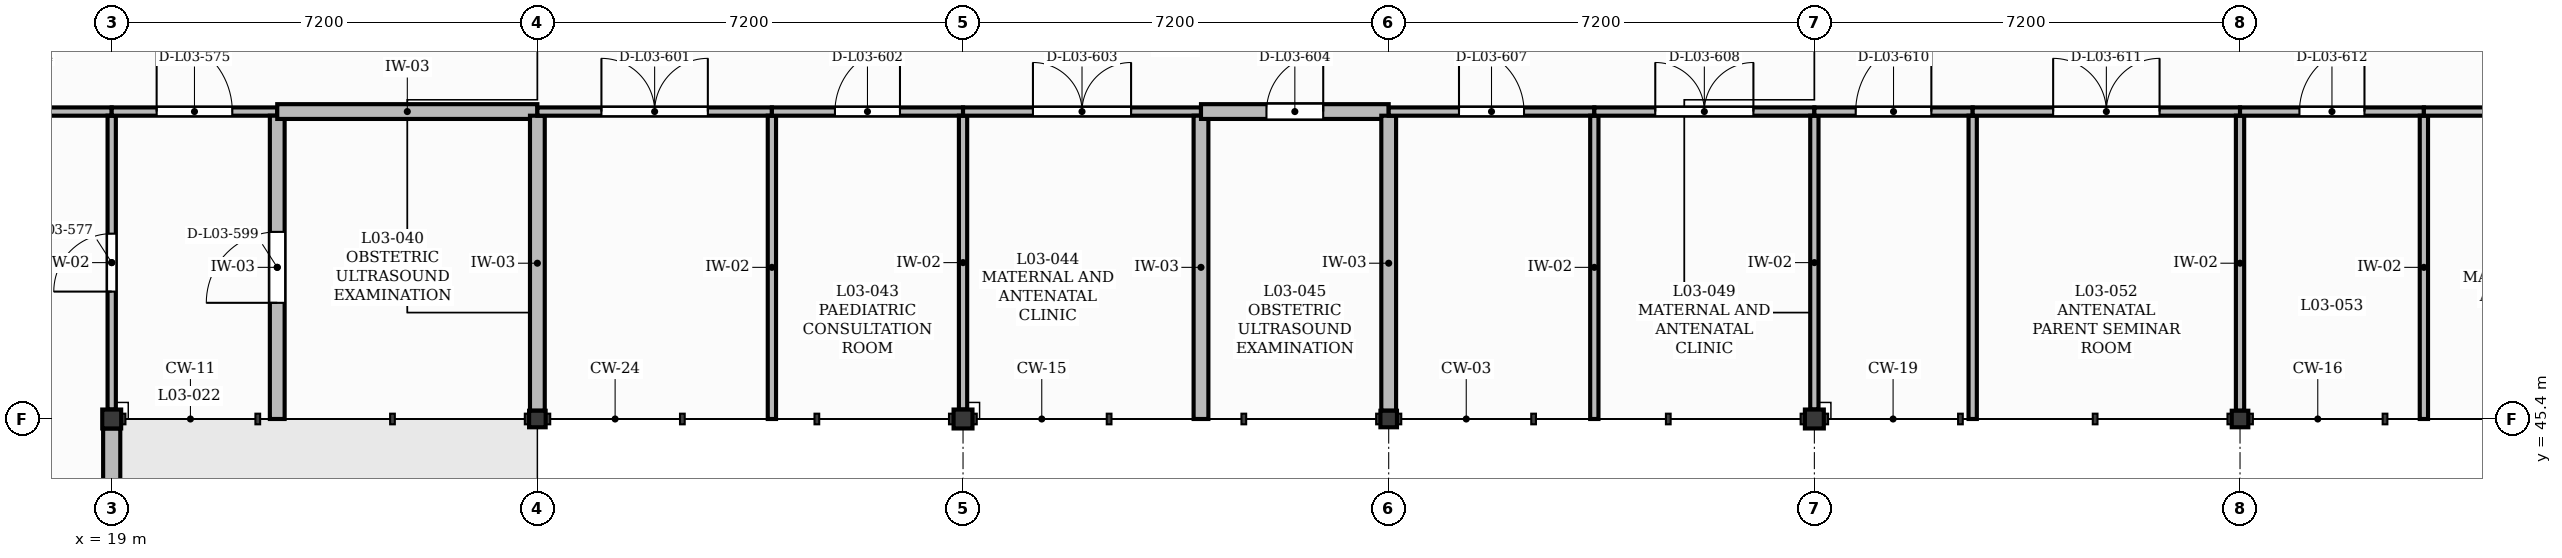
"""IFC4 building model, lengths in metres.
Left out: names, types, materials, properties, quantities, classifications, styles, units other than length and angle.
Written with IfcOpenShell. Run it as: python <this file> out.ifc"""

import sys

from ifc_helpers import new_model, si_unit, direction, frame, frame_2d, origin, origin_2d, place, context, subcontext, project, spatial, rectangle, extrude, element, fill, save


model = new_model("IFC4")
c1 = context("Model", 3, precision=1e-05, world=origin(), true_north=direction((0.0, 1.0)))
c2 = subcontext(c1, "Body", "Model", "MODEL_VIEW")
j1 = project(units=[si_unit("LENGTHUNIT", "METRE"), si_unit("PLANEANGLEUNIT", "RADIAN")], contexts=[c1])
p1 = place(None, origin())
s1 = spatial("IfcSite", under=j1, at=p1, CompositionType="ELEMENT")
p2 = place(p1, origin())
s2 = spatial("IfcBuilding", under=s1, at=p2, CompositionType="ELEMENT")
p3 = place(p2, frame((0.0, 0.0, 13.2)))
s3 = spatial("IfcBuildingStorey", under=s2, at=p3, CompositionType="ELEMENT", Elevation=13.2)
p4 = place(p3, frame((19.0, 45.4, 0.0), z_axis=(0.0, 0.0, 1.0), x_axis=(1.0, 0.0, 0.0)))
e1 = element("IfcColumn", 1, at=p4, inside=s3, PredefinedType="COLUMN", context=c2, shape_type="SweptSolid", body=[
    extrude(rectangle(XDim=0.32, YDim=0.32, at=origin_2d()), origin(), (0.0, 0.0, 1.0), 3.98),
])
p5 = place(p3, frame((26.2, 45.4, 0.0), z_axis=(0.0, 0.0, 1.0), x_axis=(1.0, 0.0, 0.0)))
e2 = element("IfcColumn", 2, at=p5, inside=s3, PredefinedType="COLUMN", context=c2, shape_type="SweptSolid", body=[
    extrude(rectangle(XDim=0.28, YDim=0.28, at=origin_2d()), origin(), (0.0, 0.0, 1.0), 4.01),
])
p6 = place(p3, frame((33.4, 45.4, 0.0), z_axis=(0.0, 0.0, 1.0), x_axis=(1.0, 0.0, 0.0)))
e3 = element("IfcColumn", 3, at=p6, inside=s3, PredefinedType="COLUMN", context=c2, shape_type="SweptSolid", body=[
    extrude(rectangle(XDim=0.32, YDim=0.32, at=origin_2d()), origin(), (0.0, 0.0, 1.0), 4.01),
])
p7 = place(p3, frame((40.6, 45.4, 0.0), z_axis=(0.0, 0.0, 1.0), x_axis=(1.0, 0.0, 0.0)))
e4 = element("IfcColumn", 4, at=p7, inside=s3, PredefinedType="COLUMN", context=c2, shape_type="SweptSolid", body=[
    extrude(rectangle(XDim=0.28, YDim=0.28, at=origin_2d()), origin(), (0.0, 0.0, 1.0), 4.01),
])
p8 = place(p3, frame((47.8, 45.4, 0.0), z_axis=(0.0, 0.0, 1.0), x_axis=(1.0, 0.0, 0.0)))
e5 = element("IfcColumn", 5, at=p8, inside=s3, PredefinedType="COLUMN", context=c2, shape_type="SweptSolid", body=[
    extrude(rectangle(XDim=0.32, YDim=0.32, at=origin_2d()), origin(), (0.0, 0.0, 1.0), 4.01),
])
p9 = place(p3, frame((55.0, 45.4, 0.0), z_axis=(0.0, 0.0, 1.0), x_axis=(1.0, 0.0, 0.0)))
e6 = element("IfcColumn", 6, at=p9, inside=s3, PredefinedType="COLUMN", context=c2, shape_type="SweptSolid", body=[
    extrude(rectangle(XDim=0.28, YDim=0.28, at=origin_2d()), origin(), (0.0, 0.0, 1.0), 3.98),
])
p10 = place(p3, frame((19.0, 36.94, 0.0), z_axis=(0.0, 0.0, 1.0), x_axis=(0.0, 1.0, 0.0)))
e7 = element("IfcWall", 7, at=p10, inside=s3, PredefinedType="SOLIDWALL", context=c2, shape_type="SweptSolid", body=[
    extrude(rectangle(XDim=8.3, YDim=0.29, at=frame_2d((4.15, 0.0))), origin(), (0.0, 0.0, 1.0), 3.49),
])
p11 = place(p10, frame((1.99, 0.0, 1.05)))
e8 = element("IfcOpeningElement", 8, at=p11, cuts=e7, PredefinedType="OPENING", context=c2, shape_type="SweptSolid", body=[
    extrude(rectangle(XDim=1.82, YDim=1.65, at=frame_2d((0.91, 0.825))), frame((0.0, 0.155, 0.0), z_axis=(0.0, -1.0, 0.0), x_axis=(1.0, 0.0, 0.0)), (0.0, 0.0, 1.0), 0.31),
])
p12 = place(p10, frame((4.49, 0.0, 1.05)))
e9 = element("IfcOpeningElement", 9, at=p12, cuts=e7, PredefinedType="OPENING", context=c2, shape_type="SweptSolid", body=[
    extrude(rectangle(XDim=1.82, YDim=1.65, at=frame_2d((0.91, 0.825))), frame((0.0, 0.155, 0.0), z_axis=(0.0, -1.0, 0.0), x_axis=(1.0, 0.0, 0.0)), (0.0, 0.0, 1.0), 0.31),
])
p13 = place(p3, frame((15.8, 50.6, 0.0), z_axis=(0.0, 0.0, 1.0), x_axis=(1.0, 0.0, 0.0)))
e10 = element("IfcWall", 10, at=p13, inside=s3, PredefinedType="PARTITIONING", context=c2, shape_type="SweptSolid", body=[
    extrude(rectangle(XDim=3.2, YDim=0.14, at=frame_2d((1.6, 0.0))), origin(), (0.0, 0.0, 1.0), 3.93),
])
p14 = place(p13, frame((1.08, 0.0, 0.0)))
e11 = element("IfcOpeningElement", 11, at=p14, cuts=e10, PredefinedType="OPENING", context=c2, shape_type="SweptSolid", body=[
    extrude(rectangle(XDim=1.04, YDim=2.1, at=frame_2d((0.52, 1.05))), frame((0.0, 0.08, 0.0), z_axis=(0.0, -1.0, 0.0), x_axis=(1.0, 0.0, 0.0)), (0.0, 0.0, 1.0), 0.16),
])
p15 = place(p3, frame((19.0, 45.56, 0.0), z_axis=(0.0, 0.0, 1.0), x_axis=(0.0, 1.0, 0.0)))
e12 = element("IfcWall", 12, at=p15, inside=s3, PredefinedType="PARTITIONING", context=c2, shape_type="SweptSolid", body=[
    extrude(rectangle(XDim=4.97, YDim=0.14, at=frame_2d((2.485, 0.0))), origin(), (0.0, 0.0, 1.0), 3.46),
])
p16 = place(p15, frame((1.995, 0.0, 0.0)))
e13 = element("IfcOpeningElement", 13, at=p16, cuts=e12, PredefinedType="OPENING", context=c2, shape_type="SweptSolid", body=[
    extrude(rectangle(XDim=0.98, YDim=2.15, at=frame_2d((0.49, 1.075))), frame((0.0, 0.08, 0.0), z_axis=(0.0, -1.0, 0.0), x_axis=(1.0, 0.0, 0.0)), (0.0, 0.0, 1.0), 0.16),
])
p17 = place(p3, frame((19.0, 50.6, 0.0), z_axis=(0.0, 0.0, 1.0), x_axis=(1.0, 0.0, 0.0)))
e14 = element("IfcWall", 14, at=p17, inside=s3, PredefinedType="PARTITIONING", context=c2, shape_type="SweptSolid", body=[
    extrude(rectangle(XDim=2.8, YDim=0.14, at=frame_2d((1.4, 0.0))), origin(), (0.0, 0.0, 1.0), 3.93),
])
p18 = place(p17, frame((0.76, 0.0, 0.0)))
e15 = element("IfcOpeningElement", 15, at=p18, cuts=e14, PredefinedType="OPENING", context=c2, shape_type="SweptSolid", body=[
    extrude(rectangle(XDim=1.28, YDim=2.2, at=frame_2d((0.64, 1.1))), frame((0.0, 0.08, 0.0), z_axis=(0.0, -1.0, 0.0), x_axis=(1.0, 0.0, 0.0)), (0.0, 0.0, 1.0), 0.16),
])
p19 = place(p3, frame((21.8, 45.4, 0.0), z_axis=(0.0, 0.0, 1.0), x_axis=(0.0, 1.0, 0.0)))
e16 = element("IfcWall", 16, at=p19, inside=s3, PredefinedType="SOLIDWALL", context=c2, shape_type="SweptSolid", body=[
    extrude(rectangle(XDim=5.13, YDim=0.25, at=frame_2d((2.565, 0.0))), origin(), (0.0, 0.0, 1.0), 3.93),
])
p20 = place(p19, frame((1.965, 0.0, 0.0)))
e17 = element("IfcOpeningElement", 17, at=p20, cuts=e16, PredefinedType="OPENING", context=c2, shape_type="SweptSolid", body=[
    extrude(rectangle(XDim=1.2, YDim=2.15, at=frame_2d((0.6, 1.075))), frame((0.0, 0.135, 0.0), z_axis=(0.0, -1.0, 0.0), x_axis=(1.0, 0.0, 0.0)), (0.0, 0.0, 1.0), 0.27),
])
p21 = place(p3, frame((21.8, 50.6, 0.0), z_axis=(0.0, 0.0, 1.0), x_axis=(1.0, 0.0, 0.0)))
e18 = element("IfcWall", 18, at=p21, inside=s3, PredefinedType="SOLIDWALL", context=c2, shape_type="SweptSolid", body=[
    extrude(rectangle(XDim=4.4, YDim=0.25, at=frame_2d((2.2, 0.0))), origin(), (0.0, 0.0, 1.0), 3.96),
])
p22 = place(p3, frame((26.2, 45.54, 0.0), z_axis=(0.0, 0.0, 1.0), x_axis=(0.0, 1.0, 0.0)))
e19 = element("IfcWall", 19, at=p22, inside=s3, PredefinedType="SOLIDWALL", context=c2, shape_type="SweptSolid", body=[
    extrude(rectangle(XDim=4.99, YDim=0.25, at=frame_2d((2.495, 0.0))), origin(), (0.0, 0.0, 1.0), 3.49),
])
p23 = place(p3, frame((26.2, 50.6, 0.0), z_axis=(0.0, 0.0, 1.0), x_axis=(1.0, 0.0, 0.0)))
e20 = element("IfcWall", 20, at=p23, inside=s3, PredefinedType="PARTITIONING", context=c2, shape_type="SweptSolid", body=[
    extrude(rectangle(XDim=3.967, YDim=0.14, at=frame_2d((1.983, 0.0))), origin(), (0.0, 0.0, 1.0), 3.96),
])
p24 = place(p23, frame((1.083, 0.0, 0.0)))
e21 = element("IfcOpeningElement", 21, at=p24, cuts=e20, PredefinedType="OPENING", context=c2, shape_type="SweptSolid", body=[
    extrude(rectangle(XDim=1.8, YDim=2.3, at=frame_2d((0.9, 1.15))), frame((0.0, 0.08, 0.0), z_axis=(0.0, -1.0, 0.0), x_axis=(1.0, 0.0, 0.0)), (0.0, 0.0, 1.0), 0.16),
])
p25 = place(p3, frame((30.167, 45.4, 0.0), z_axis=(0.0, 0.0, 1.0), x_axis=(0.0, 1.0, 0.0)))
e22 = element("IfcWall", 22, at=p25, inside=s3, PredefinedType="PARTITIONING", context=c2, shape_type="SweptSolid", body=[
    extrude(rectangle(XDim=5.13, YDim=0.14, at=frame_2d((2.565, 0.0))), origin(), (0.0, 0.0, 1.0), 3.96),
])
p26 = place(p3, frame((30.167, 50.6, 0.0), z_axis=(0.0, 0.0, 1.0), x_axis=(1.0, 0.0, 0.0)))
e23 = element("IfcWall", 23, at=p26, inside=s3, PredefinedType="PARTITIONING", context=c2, shape_type="SweptSolid", body=[
    extrude(rectangle(XDim=3.233, YDim=0.14, at=frame_2d((1.616, 0.0))), origin(), (0.0, 0.0, 1.0), 3.96),
])
p27 = place(p26, frame((1.066, 0.0, 0.0)))
e24 = element("IfcOpeningElement", 24, at=p27, cuts=e23, PredefinedType="OPENING", context=c2, shape_type="SweptSolid", body=[
    extrude(rectangle(XDim=1.1, YDim=2.1, at=frame_2d((0.55, 1.05))), frame((0.0, 0.08, 0.0), z_axis=(0.0, -1.0, 0.0), x_axis=(1.0, 0.0, 0.0)), (0.0, 0.0, 1.0), 0.16),
])
p28 = place(p3, frame((33.4, 45.56, 0.0), z_axis=(0.0, 0.0, 1.0), x_axis=(0.0, 1.0, 0.0)))
e25 = element("IfcWall", 25, at=p28, inside=s3, PredefinedType="PARTITIONING", context=c2, shape_type="SweptSolid", body=[
    extrude(rectangle(XDim=4.97, YDim=0.14, at=frame_2d((2.485, 0.0))), origin(), (0.0, 0.0, 1.0), 3.49),
])
p29 = place(p3, frame((33.4, 50.6, 0.0), z_axis=(0.0, 0.0, 1.0), x_axis=(1.0, 0.0, 0.0)))
e26 = element("IfcWall", 26, at=p29, inside=s3, PredefinedType="PARTITIONING", context=c2, shape_type="SweptSolid", body=[
    extrude(rectangle(XDim=4.025, YDim=0.14, at=frame_2d((2.013, 0.0))), origin(), (0.0, 0.0, 1.0), 3.96),
])
p30 = place(p29, frame((1.183, 0.0, 0.0)))
e27 = element("IfcOpeningElement", 27, at=p30, cuts=e26, PredefinedType="OPENING", context=c2, shape_type="SweptSolid", body=[
    extrude(rectangle(XDim=1.66, YDim=2.3, at=frame_2d((0.83, 1.15))), frame((0.0, 0.08, 0.0), z_axis=(0.0, -1.0, 0.0), x_axis=(1.0, 0.0, 0.0)), (0.0, 0.0, 1.0), 0.16),
])
p31 = place(p3, frame((37.425, 45.4, 0.0), z_axis=(0.0, 0.0, 1.0), x_axis=(0.0, 1.0, 0.0)))
e28 = element("IfcWall", 28, at=p31, inside=s3, PredefinedType="SOLIDWALL", context=c2, shape_type="SweptSolid", body=[
    extrude(rectangle(XDim=5.13, YDim=0.25, at=frame_2d((2.565, 0.0))), origin(), (0.0, 0.0, 1.0), 3.96),
])
p32 = place(p3, frame((37.425, 50.6, 0.0), z_axis=(0.0, 0.0, 1.0), x_axis=(1.0, 0.0, 0.0)))
e29 = element("IfcWall", 29, at=p32, inside=s3, PredefinedType="SOLIDWALL", context=c2, shape_type="SweptSolid", body=[
    extrude(rectangle(XDim=3.175, YDim=0.25, at=frame_2d((1.587, 0.0))), origin(), (0.0, 0.0, 1.0), 3.96),
])
p33 = place(p32, frame((1.107, 0.0, 0.0)))
e30 = element("IfcOpeningElement", 30, at=p33, cuts=e29, PredefinedType="OPENING", context=c2, shape_type="SweptSolid", body=[
    extrude(rectangle(XDim=0.96, YDim=2.1, at=frame_2d((0.48, 1.05))), frame((0.0, 0.135, 0.0), z_axis=(0.0, -1.0, 0.0), x_axis=(1.0, 0.0, 0.0)), (0.0, 0.0, 1.0), 0.27),
])
p34 = place(p3, frame((40.6, 45.54, 0.0), z_axis=(0.0, 0.0, 1.0), x_axis=(0.0, 1.0, 0.0)))
e31 = element("IfcWall", 31, at=p34, inside=s3, PredefinedType="SOLIDWALL", context=c2, shape_type="SweptSolid", body=[
    extrude(rectangle(XDim=4.99, YDim=0.25, at=frame_2d((2.495, 0.0))), origin(), (0.0, 0.0, 1.0), 3.49),
])
p35 = place(p3, frame((40.6, 50.6, 0.0), z_axis=(0.0, 0.0, 1.0), x_axis=(1.0, 0.0, 0.0)))
e32 = element("IfcWall", 32, at=p35, inside=s3, PredefinedType="PARTITIONING", context=c2, shape_type="SweptSolid", body=[
    extrude(rectangle(XDim=3.478, YDim=0.14, at=frame_2d((1.739, 0.0))), origin(), (0.0, 0.0, 1.0), 3.96),
])
p36 = place(p35, frame((1.189, 0.0, 0.0)))
e33 = element("IfcOpeningElement", 33, at=p36, cuts=e32, PredefinedType="OPENING", context=c2, shape_type="SweptSolid", body=[
    extrude(rectangle(XDim=1.1, YDim=2.1, at=frame_2d((0.55, 1.05))), frame((0.0, 0.08, 0.0), z_axis=(0.0, -1.0, 0.0), x_axis=(1.0, 0.0, 0.0)), (0.0, 0.0, 1.0), 0.16),
])
p37 = place(p3, frame((44.078, 45.4, 0.0), z_axis=(0.0, 0.0, 1.0), x_axis=(0.0, 1.0, 0.0)))
e34 = element("IfcWall", 34, at=p37, inside=s3, PredefinedType="PARTITIONING", context=c2, shape_type="SweptSolid", body=[
    extrude(rectangle(XDim=5.13, YDim=0.14, at=frame_2d((2.565, 0.0))), origin(), (0.0, 0.0, 1.0), 3.96),
])
p38 = place(p3, frame((44.078, 50.6, 0.0), z_axis=(0.0, 0.0, 1.0), x_axis=(1.0, 0.0, 0.0)))
e35 = element("IfcWall", 35, at=p38, inside=s3, PredefinedType="PARTITIONING", context=c2, shape_type="SweptSolid", body=[
    extrude(rectangle(XDim=3.722, YDim=0.14, at=frame_2d((1.861, 0.0))), origin(), (0.0, 0.0, 1.0), 3.96),
])
p39 = place(p38, frame((1.031, 0.0, 0.0)))
e36 = element("IfcOpeningElement", 36, at=p39, cuts=e35, PredefinedType="OPENING", context=c2, shape_type="SweptSolid", body=[
    extrude(rectangle(XDim=1.66, YDim=2.3, at=frame_2d((0.83, 1.15))), frame((0.0, 0.08, 0.0), z_axis=(0.0, -1.0, 0.0), x_axis=(1.0, 0.0, 0.0)), (0.0, 0.0, 1.0), 0.16),
])
p40 = place(p3, frame((47.8, 45.56, 0.0), z_axis=(0.0, 0.0, 1.0), x_axis=(0.0, 1.0, 0.0)))
e37 = element("IfcWall", 37, at=p40, inside=s3, PredefinedType="PARTITIONING", context=c2, shape_type="SweptSolid", body=[
    extrude(rectangle(XDim=4.97, YDim=0.14, at=frame_2d((2.485, 0.0))), origin(), (0.0, 0.0, 1.0), 3.49),
])
p41 = place(p3, frame((47.8, 50.6, 0.0), z_axis=(0.0, 0.0, 1.0), x_axis=(1.0, 0.0, 0.0)))
e38 = element("IfcWall", 38, at=p41, inside=s3, PredefinedType="PARTITIONING", context=c2, shape_type="SweptSolid", body=[
    extrude(rectangle(XDim=2.678, YDim=0.14, at=frame_2d((1.339, 0.0))), origin(), (0.0, 0.0, 1.0), 3.96),
])
p42 = place(p41, frame((0.699, 0.0, 0.0)))
e39 = element("IfcOpeningElement", 39, at=p42, cuts=e38, PredefinedType="OPENING", context=c2, shape_type="SweptSolid", body=[
    extrude(rectangle(XDim=1.28, YDim=2.2, at=frame_2d((0.64, 1.1))), frame((0.0, 0.08, 0.0), z_axis=(0.0, -1.0, 0.0), x_axis=(1.0, 0.0, 0.0)), (0.0, 0.0, 1.0), 0.16),
])
p43 = place(p3, frame((50.478, 45.4, 0.0), z_axis=(0.0, 0.0, 1.0), x_axis=(0.0, 1.0, 0.0)))
e40 = element("IfcWall", 40, at=p43, inside=s3, PredefinedType="PARTITIONING", context=c2, shape_type="SweptSolid", body=[
    extrude(rectangle(XDim=5.13, YDim=0.14, at=frame_2d((2.565, 0.0))), origin(), (0.0, 0.0, 1.0), 3.96),
])
p44 = place(p3, frame((50.478, 50.6, 0.0), z_axis=(0.0, 0.0, 1.0), x_axis=(1.0, 0.0, 0.0)))
e41 = element("IfcWall", 41, at=p44, inside=s3, PredefinedType="PARTITIONING", context=c2, shape_type="SweptSolid", body=[
    extrude(rectangle(XDim=4.522, YDim=0.14, at=frame_2d((2.261, 0.0))), origin(), (0.0, 0.0, 1.0), 3.96),
])
p45 = place(p44, frame((1.361, 0.0, 0.0)))
e42 = element("IfcOpeningElement", 42, at=p45, cuts=e41, PredefinedType="OPENING", context=c2, shape_type="SweptSolid", body=[
    extrude(rectangle(XDim=1.8, YDim=2.3, at=frame_2d((0.9, 1.15))), frame((0.0, 0.08, 0.0), z_axis=(0.0, -1.0, 0.0), x_axis=(1.0, 0.0, 0.0)), (0.0, 0.0, 1.0), 0.16),
])
p46 = place(p3, frame((55.0, 45.54, 0.0), z_axis=(0.0, 0.0, 1.0), x_axis=(0.0, 1.0, 0.0)))
e43 = element("IfcWall", 43, at=p46, inside=s3, PredefinedType="PARTITIONING", context=c2, shape_type="SweptSolid", body=[
    extrude(rectangle(XDim=4.99, YDim=0.14, at=frame_2d((2.495, 0.0))), origin(), (0.0, 0.0, 1.0), 3.52),
])
p47 = place(p3, frame((55.0, 50.6, 0.0), z_axis=(0.0, 0.0, 1.0), x_axis=(1.0, 0.0, 0.0)))
e44 = element("IfcWall", 44, at=p47, inside=s3, PredefinedType="PARTITIONING", context=c2, shape_type="SweptSolid", body=[
    extrude(rectangle(XDim=3.11, YDim=0.14, at=frame_2d((1.555, 0.0))), origin(), (0.0, 0.0, 1.0), 3.96),
])
p48 = place(p47, frame((1.005, 0.0, 0.0)))
e45 = element("IfcOpeningElement", 45, at=p48, cuts=e44, PredefinedType="OPENING", context=c2, shape_type="SweptSolid", body=[
    extrude(rectangle(XDim=1.1, YDim=2.1, at=frame_2d((0.55, 1.05))), frame((0.0, 0.08, 0.0), z_axis=(0.0, -1.0, 0.0), x_axis=(1.0, 0.0, 0.0)), (0.0, 0.0, 1.0), 0.16),
])
p49 = place(p3, frame((58.11, 45.4, 0.0), z_axis=(0.0, 0.0, 1.0), x_axis=(0.0, 1.0, 0.0)))
e46 = element("IfcWall", 46, at=p49, inside=s3, PredefinedType="PARTITIONING", context=c2, shape_type="SweptSolid", body=[
    extrude(rectangle(XDim=5.13, YDim=0.14, at=frame_2d((2.565, 0.0))), origin(), (0.0, 0.0, 1.0), 3.96),
])
p50 = place(p3, frame((58.11, 50.6, 0.0), z_axis=(0.0, 0.0, 1.0), x_axis=(1.0, 0.0, 0.0)))
e47 = element("IfcWall", 47, at=p50, inside=s3, PredefinedType="PARTITIONING", context=c2, shape_type="SweptSolid", body=[
    extrude(rectangle(XDim=4.09, YDim=0.14, at=frame_2d((2.045, 0.0))), origin(), (0.0, 0.0, 1.0), 3.96),
])
p51 = place(p50, frame((1.215, 0.0, 0.0)))
e48 = element("IfcOpeningElement", 48, at=p51, cuts=e47, PredefinedType="OPENING", context=c2, shape_type="SweptSolid", body=[
    extrude(rectangle(XDim=1.66, YDim=2.3, at=frame_2d((0.83, 1.15))), frame((0.0, 0.08, 0.0), z_axis=(0.0, -1.0, 0.0), x_axis=(1.0, 0.0, 0.0)), (0.0, 0.0, 1.0), 0.16),
])
p52 = place(p18, origin())
e49 = element("IfcDoor", 49, at=p52, inside=s3, OperationType="SINGLE_SWING_LEFT", PredefinedType="DOOR", context=c2, shape_type="SweptSolid", body=[
    extrude(rectangle(XDim=1.28, YDim=2.2, at=frame_2d((0.64, 1.1))), frame((0.0, 0.025, 0.0), z_axis=(0.0, -1.0, 0.0), x_axis=(1.0, 0.0, 0.0)), (0.0, 0.0, 1.0), 0.05),
])
fill(e15, e49)
p53 = place(p16, origin())
e50 = element("IfcDoor", 50, at=p53, inside=s3, OperationType="SINGLE_SWING_LEFT", PredefinedType="DOOR", context=c2, shape_type="SweptSolid", body=[
    extrude(rectangle(XDim=0.98, YDim=2.15, at=frame_2d((0.49, 1.075))), frame((0.0, 0.025, 0.0), z_axis=(0.0, -1.0, 0.0), x_axis=(1.0, 0.0, 0.0)), (0.0, 0.0, 1.0), 0.05),
])
fill(e13, e50)
p54 = place(p20, origin())
e51 = element("IfcDoor", 51, at=p54, inside=s3, OperationType="SINGLE_SWING_LEFT", PredefinedType="DOOR", context=c2, shape_type="SweptSolid", body=[
    extrude(rectangle(XDim=1.2, YDim=2.15, at=frame_2d((0.6, 1.075))), frame((0.0, 0.025, 0.0), z_axis=(0.0, -1.0, 0.0), x_axis=(1.0, 0.0, 0.0)), (0.0, 0.0, 1.0), 0.05),
])
fill(e17, e51)
p55 = place(p24, origin())
e52 = element("IfcDoor", 52, at=p55, inside=s3, OperationType="DOUBLE_DOOR_SINGLE_SWING", PredefinedType="DOOR", context=c2, shape_type="SweptSolid", body=[
    extrude(rectangle(XDim=1.8, YDim=2.3, at=frame_2d((0.9, 1.15))), frame((0.0, 0.025, 0.0), z_axis=(0.0, -1.0, 0.0), x_axis=(1.0, 0.0, 0.0)), (0.0, 0.0, 1.0), 0.05),
])
fill(e21, e52)
p56 = place(p27, origin())
e53 = element("IfcDoor", 53, at=p56, inside=s3, OperationType="SINGLE_SWING_RIGHT", PredefinedType="DOOR", context=c2, shape_type="SweptSolid", body=[
    extrude(rectangle(XDim=1.1, YDim=2.1, at=frame_2d((0.55, 1.05))), frame((0.0, 0.025, 0.0), z_axis=(0.0, -1.0, 0.0), x_axis=(1.0, 0.0, 0.0)), (0.0, 0.0, 1.0), 0.05),
])
fill(e24, e53)
p57 = place(p30, origin())
e54 = element("IfcDoor", 54, at=p57, inside=s3, OperationType="DOUBLE_DOOR_SINGLE_SWING", PredefinedType="DOOR", context=c2, shape_type="SweptSolid", body=[
    extrude(rectangle(XDim=1.66, YDim=2.3, at=frame_2d((0.83, 1.15))), frame((0.0, 0.025, 0.0), z_axis=(0.0, -1.0, 0.0), x_axis=(1.0, 0.0, 0.0)), (0.0, 0.0, 1.0), 0.05),
])
fill(e27, e54)
p58 = place(p33, origin())
e55 = element("IfcDoor", 55, at=p58, inside=s3, OperationType="SINGLE_SWING_RIGHT", PredefinedType="DOOR", context=c2, shape_type="SweptSolid", body=[
    extrude(rectangle(XDim=0.96, YDim=2.1, at=frame_2d((0.48, 1.05))), frame((0.0, 0.025, 0.0), z_axis=(0.0, -1.0, 0.0), x_axis=(1.0, 0.0, 0.0)), (0.0, 0.0, 1.0), 0.05),
])
fill(e30, e55)
p59 = place(p36, origin())
e56 = element("IfcDoor", 56, at=p59, inside=s3, OperationType="SINGLE_SWING_LEFT", PredefinedType="DOOR", context=c2, shape_type="SweptSolid", body=[
    extrude(rectangle(XDim=1.1, YDim=2.1, at=frame_2d((0.55, 1.05))), frame((0.0, 0.025, 0.0), z_axis=(0.0, -1.0, 0.0), x_axis=(1.0, 0.0, 0.0)), (0.0, 0.0, 1.0), 0.05),
])
fill(e33, e56)
p60 = place(p39, origin())
e57 = element("IfcDoor", 57, at=p60, inside=s3, OperationType="DOUBLE_DOOR_SINGLE_SWING", PredefinedType="DOOR", context=c2, shape_type="SweptSolid", body=[
    extrude(rectangle(XDim=1.66, YDim=2.3, at=frame_2d((0.83, 1.15))), frame((0.0, 0.025, 0.0), z_axis=(0.0, -1.0, 0.0), x_axis=(1.0, 0.0, 0.0)), (0.0, 0.0, 1.0), 0.05),
])
fill(e36, e57)
p61 = place(p42, origin())
e58 = element("IfcDoor", 58, at=p61, inside=s3, OperationType="SINGLE_SWING_RIGHT", PredefinedType="DOOR", context=c2, shape_type="SweptSolid", body=[
    extrude(rectangle(XDim=1.28, YDim=2.2, at=frame_2d((0.64, 1.1))), frame((0.0, 0.025, 0.0), z_axis=(0.0, -1.0, 0.0), x_axis=(1.0, 0.0, 0.0)), (0.0, 0.0, 1.0), 0.05),
])
fill(e39, e58)
p62 = place(p45, origin())
e59 = element("IfcDoor", 59, at=p62, inside=s3, OperationType="DOUBLE_DOOR_SINGLE_SWING", PredefinedType="DOOR", context=c2, shape_type="SweptSolid", body=[
    extrude(rectangle(XDim=1.8, YDim=2.3, at=frame_2d((0.9, 1.15))), frame((0.0, 0.025, 0.0), z_axis=(0.0, -1.0, 0.0), x_axis=(1.0, 0.0, 0.0)), (0.0, 0.0, 1.0), 0.05),
])
fill(e42, e59)
p63 = place(p48, origin())
e60 = element("IfcDoor", 60, at=p63, inside=s3, OperationType="SINGLE_SWING_RIGHT", PredefinedType="DOOR", context=c2, shape_type="SweptSolid", body=[
    extrude(rectangle(XDim=1.1, YDim=2.1, at=frame_2d((0.55, 1.05))), frame((0.0, 0.025, 0.0), z_axis=(0.0, -1.0, 0.0), x_axis=(1.0, 0.0, 0.0)), (0.0, 0.0, 1.0), 0.05),
])
fill(e45, e60)
save(model, sys.argv[1])
